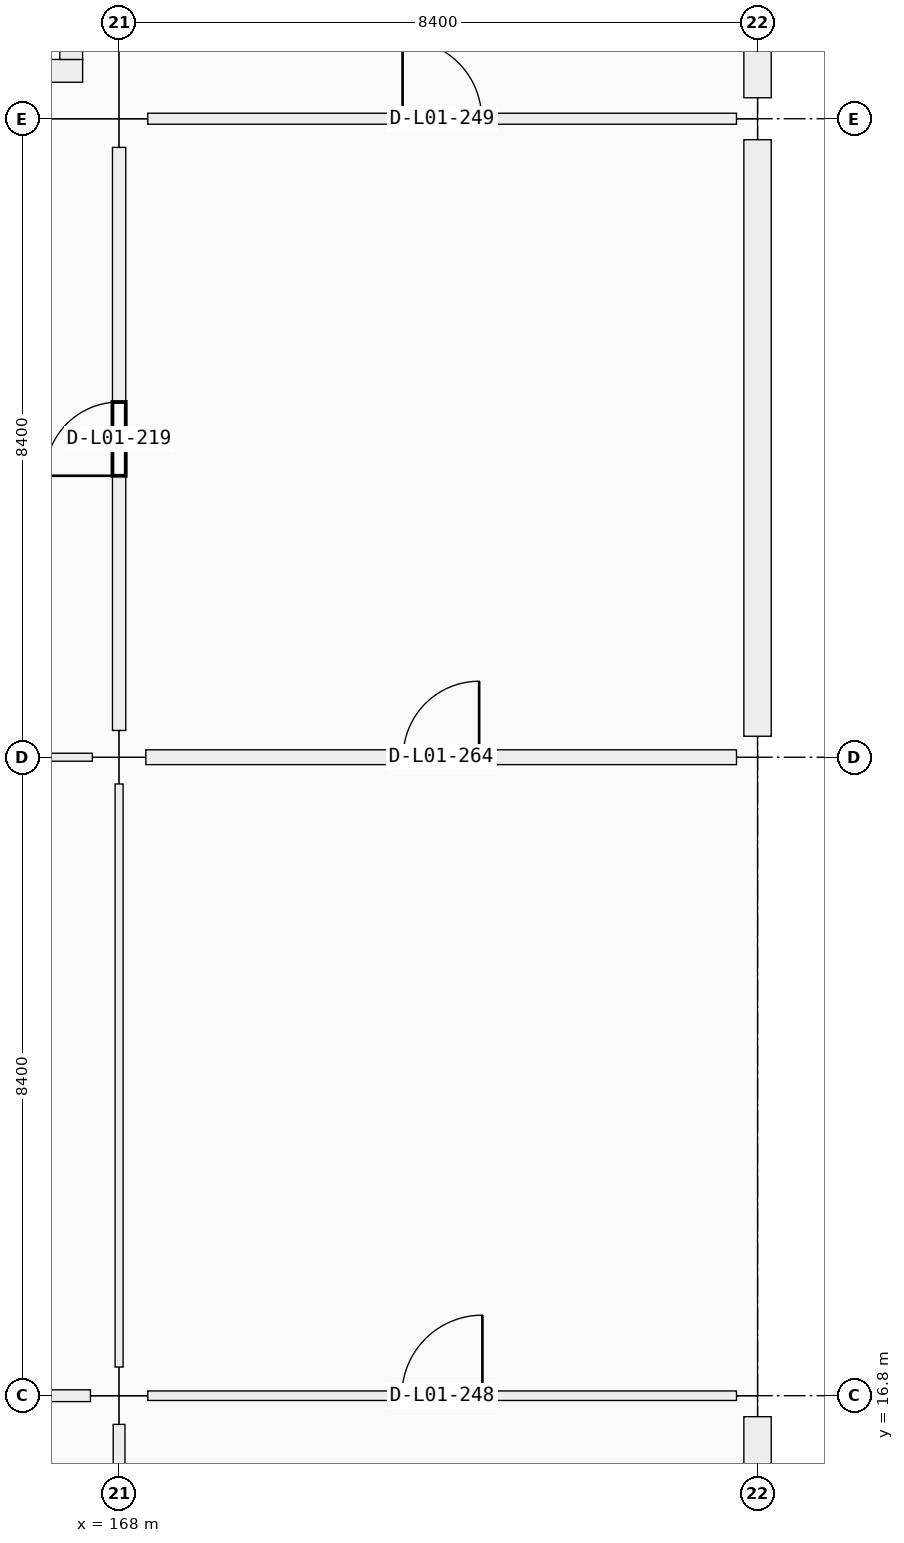
"""IFC4 building model, lengths in metres.
Left out: names, types, materials, properties, quantities, classifications, styles, units other than length and angle.
Written with IfcOpenShell. Run it as: python <this file> out.ifc"""

import sys

from ifc_helpers import new_model, si_unit, direction, frame, frame_2d, origin, origin_2d, place, context, subcontext, project, spatial, rectangle, extrude, element, fill, save


model = new_model("IFC4")
c1 = context("Model", 3, precision=1e-05, world=origin(), true_north=direction((0.0, 1.0)))
c2 = subcontext(c1, "Body", "Model", "MODEL_VIEW")
j1 = project(units=[si_unit("LENGTHUNIT", "METRE"), si_unit("PLANEANGLEUNIT", "RADIAN")], contexts=[c1])
p1 = place(None, origin())
s1 = spatial("IfcSite", under=j1, at=p1, CompositionType="ELEMENT")
p2 = place(p1, origin())
s2 = spatial("IfcBuilding", under=s1, at=p2, CompositionType="ELEMENT")
p3 = place(p2, frame((0.0, 0.0, 5.76)))
s3 = spatial("IfcBuildingStorey", under=s2, at=p3, CompositionType="ELEMENT", Elevation=5.76)
p4 = place(p3, frame((168.0, 16.8, 0.0), z_axis=(0.0, 0.0, 1.0), x_axis=(1.0, 0.0, 0.0)))
e1 = element("IfcColumn", 1, at=p4, inside=s3, PredefinedType="COLUMN", context=c2, shape_type="SweptSolid", body=[
    extrude(rectangle(XDim=0.75, YDim=0.75, at=origin_2d()), origin(), (0.0, 0.0, 1.0), 4.5),
])
p5 = place(p3, frame((168.0, 25.2, 0.0), z_axis=(0.0, 0.0, 1.0), x_axis=(1.0, 0.0, 0.0)))
e2 = element("IfcColumn", 2, at=p5, inside=s3, PredefinedType="COLUMN", context=c2, shape_type="SweptSolid", body=[
    extrude(rectangle(XDim=0.7, YDim=0.7, at=origin_2d()), origin(), (0.0, 0.0, 1.0), 4.5),
])
p6 = place(p3, frame((168.0, 33.6, 0.0), z_axis=(0.0, 0.0, 1.0), x_axis=(1.0, 0.0, 0.0)))
e3 = element("IfcColumn", 3, at=p6, inside=s3, PredefinedType="COLUMN", context=c2, shape_type="SweptSolid", body=[
    extrude(rectangle(XDim=0.75, YDim=0.75, at=origin_2d()), origin(), (0.0, 0.0, 1.0), 4.5),
])
for number, where, z_axis, x_axis in (
    (4, (176.4, 16.8, 0.0), (0.0, 0.0, 1.0), (1.0, 0.0, 0.0)),
    (5, (176.4, 25.2, 0.0), (0.0, 0.0, 1.0), (1.0, 0.0, 0.0)),
    (6, (176.4, 33.6, 0.0), (0.0, 0.0, 1.0), (1.0, 0.0, 0.0)),
):
    element("IfcColumn", number, at=place(p3, frame(where, z_axis=z_axis, x_axis=x_axis)), inside=s3, PredefinedType="COLUMN", context=c2, shape_type="SweptSolid", body=[
        extrude(rectangle(XDim=0.55, YDim=0.55, at=origin_2d()), origin(), (0.0, 0.0, 1.0), 4.2),
    ])
p7 = place(p3, frame((176.4, 16.524, 0.0), z_axis=(0.0, 0.0, 1.0), x_axis=(0.0, -1.0, 0.0)))
e7 = element("IfcWall", 7, at=p7, inside=s3, PredefinedType="SOLIDWALL", context=c2, shape_type="SweptSolid", body=[
    extrude(rectangle(XDim=7.848, YDim=0.36, at=frame_2d((3.924, 0.0))), origin(), (0.0, 0.0, 1.0), 3.4),
])
p8 = place(p7, frame((2.649, 0.0, 0.9)))
e8 = element("IfcOpeningElement", 8, at=p8, cuts=e7, PredefinedType="OPENING", context=c2, shape_type="SweptSolid", body=[
    extrude(rectangle(XDim=2.55, YDim=1.95, at=frame_2d((1.275, 0.975))), frame((0.0, 0.18, 0.0), z_axis=(0.0, -1.0, 0.0), x_axis=(1.0, 0.0, 0.0)), (0.0, 0.0, 1.0), 0.36),
])
p9 = place(p3, frame((176.4, 33.324, 0.0), z_axis=(0.0, 0.0, 1.0), x_axis=(0.0, -1.0, 0.0)))
e9 = element("IfcWall", 9, at=p9, inside=s3, PredefinedType="SOLIDWALL", context=c2, shape_type="SweptSolid", body=[
    extrude(rectangle(XDim=7.848, YDim=0.36, at=frame_2d((3.924, 0.0))), origin(), (0.0, 0.0, 1.0), 3.4),
])
p10 = place(p9, frame((3.274, 0.0, 0.9)))
e10 = element("IfcOpeningElement", 10, at=p10, cuts=e9, PredefinedType="OPENING", context=c2, shape_type="SweptSolid", body=[
    extrude(rectangle(XDim=1.3, YDim=1.95, at=frame_2d((0.65, 0.975))), frame((0.0, 0.18, 0.0), z_axis=(0.0, -1.0, 0.0), x_axis=(1.0, 0.0, 0.0)), (0.0, 0.0, 1.0), 0.36),
])
p11 = place(p3, frame((176.4, 41.724, 0.0), z_axis=(0.0, 0.0, 1.0), x_axis=(0.0, -1.0, 0.0)))
e11 = element("IfcWall", 11, at=p11, inside=s3, PredefinedType="SOLIDWALL", context=c2, shape_type="SweptSolid", body=[
    extrude(rectangle(XDim=7.848, YDim=0.36, at=frame_2d((3.924, 0.0))), origin(), (0.0, 0.0, 1.0), 3.4),
])
p12 = place(p11, frame((2.949, 0.0, 0.9)))
e12 = element("IfcOpeningElement", 12, at=p12, cuts=e11, PredefinedType="OPENING", context=c2, shape_type="SweptSolid", body=[
    extrude(rectangle(XDim=1.95, YDim=1.6, at=frame_2d((0.975, 0.8))), frame((0.0, 0.18, 0.0), z_axis=(0.0, -1.0, 0.0), x_axis=(1.0, 0.0, 0.0)), (0.0, 0.0, 1.0), 0.36),
])
p13 = place(p3, frame((167.52, 34.23, 0.0), z_axis=(0.0, 0.0, 1.0), x_axis=(-1.0, 0.0, 0.0)))
e13 = element("IfcWall", 13, at=p13, inside=s3, PredefinedType="SHEAR", context=c2, shape_type="SweptSolid", body=[
    extrude(rectangle(XDim=7.44, YDim=0.3, at=frame_2d((3.72, 0.0))), origin(), (0.0, 0.0, 1.0), 4.5),
])
p14 = place(p13, frame((1.28, 0.0, 0.0)))
e14 = element("IfcOpeningElement", 14, at=p14, cuts=e13, PredefinedType="OPENING", context=c2, shape_type="SweptSolid", body=[
    extrude(rectangle(XDim=1.5, YDim=2.15, at=frame_2d((0.75, 1.075))), frame((0.0, 0.15, 0.0), z_axis=(0.0, -1.0, 0.0), x_axis=(1.0, 0.0, 0.0)), (0.0, 0.0, 1.0), 0.3),
])
p15 = place(p3, frame((167.37, 41.22, 0.0), z_axis=(0.0, 0.0, 1.0), x_axis=(0.0, -1.0, 0.0)))
e15 = element("IfcWall", 15, at=p15, inside=s3, PredefinedType="SHEAR", context=c2, shape_type="SweptSolid", body=[
    extrude(rectangle(XDim=6.84, YDim=0.3, at=frame_2d((3.42, 0.0))), origin(), (0.0, 0.0, 1.0), 4.5),
])
p16 = place(p3, frame((159.952, 16.8, 0.0), z_axis=(0.0, 0.0, 1.0), x_axis=(1.0, 0.0, 0.0)))
e16 = element("IfcWall", 16, at=p16, inside=s3, PredefinedType="PARTITIONING", context=c2, shape_type="SweptSolid", body=[
    extrude(rectangle(XDim=7.671, YDim=0.155, at=frame_2d((3.835, 0.0))), origin(), (0.0, 0.0, 1.0), 2.4),
])
p17 = place(p16, frame((3.325, 0.0, 0.0)))
e17 = element("IfcOpeningElement", 17, at=p17, cuts=e16, PredefinedType="OPENING", context=c2, shape_type="SweptSolid", body=[
    extrude(rectangle(XDim=1.02, YDim=2.2, at=frame_2d((0.51, 1.1))), frame((0.0, 0.078, 0.0), z_axis=(0.0, -1.0, 0.0), x_axis=(1.0, 0.0, 0.0)), (0.0, 0.0, 1.0), 0.155),
])
p18 = place(p3, frame((159.977, 25.2, 0.0), z_axis=(0.0, 0.0, 1.0), x_axis=(1.0, 0.0, 0.0)))
e18 = element("IfcWall", 18, at=p18, inside=s3, PredefinedType="PARTITIONING", context=c2, shape_type="SweptSolid", body=[
    extrude(rectangle(XDim=7.671, YDim=0.105, at=frame_2d((3.835, 0.0))), origin(), (0.0, 0.0, 1.0), 2.4),
])
p19 = place(p18, frame((3.331, 0.0, 0.0)))
e19 = element("IfcOpeningElement", 19, at=p19, cuts=e18, PredefinedType="OPENING", context=c2, shape_type="SweptSolid", body=[
    extrude(rectangle(XDim=1.01, YDim=2.12, at=frame_2d((0.505, 1.06))), frame((0.0, 0.052, 0.0), z_axis=(0.0, -1.0, 0.0), x_axis=(1.0, 0.0, 0.0)), (0.0, 0.0, 1.0), 0.105),
])
p20 = place(p3, frame((168.377, 16.8, 0.0), z_axis=(0.0, 0.0, 1.0), x_axis=(1.0, 0.0, 0.0)))
e20 = element("IfcWall", 20, at=p20, inside=s3, PredefinedType="PARTITIONING", context=c2, shape_type="SweptSolid", body=[
    extrude(rectangle(XDim=7.746, YDim=0.125, at=frame_2d((3.873, 0.0))), origin(), (0.0, 0.0, 1.0), 2.4),
])
p21 = place(p20, frame((3.343, 0.0, 0.0)))
e21 = element("IfcOpeningElement", 21, at=p21, cuts=e20, PredefinedType="OPENING", context=c2, shape_type="SweptSolid", body=[
    extrude(rectangle(XDim=1.06, YDim=2.22, at=frame_2d((0.53, 1.11))), frame((0.0, 0.062, 0.0), z_axis=(0.0, -1.0, 0.0), x_axis=(1.0, 0.0, 0.0)), (0.0, 0.0, 1.0), 0.125),
])
p22 = place(p3, frame((168.352, 25.2, 0.0), z_axis=(0.0, 0.0, 1.0), x_axis=(1.0, 0.0, 0.0)))
e22 = element("IfcWall", 22, at=p22, inside=s3, PredefinedType="PARTITIONING", context=c2, shape_type="SweptSolid", body=[
    extrude(rectangle(XDim=7.771, YDim=0.195, at=frame_2d((3.885, 0.0))), origin(), (0.0, 0.0, 1.0), 2.4),
])
p23 = place(p22, frame((3.385, 0.0, 0.0)))
e23 = element("IfcOpeningElement", 23, at=p23, cuts=e22, PredefinedType="OPENING", context=c2, shape_type="SweptSolid", body=[
    extrude(rectangle(XDim=1.0, YDim=2.2, at=frame_2d((0.5, 1.1))), frame((0.0, 0.098, 0.0), z_axis=(0.0, -1.0, 0.0), x_axis=(1.0, 0.0, 0.0)), (0.0, 0.0, 1.0), 0.195),
])
p24 = place(p3, frame((168.377, 33.6, 0.0), z_axis=(0.0, 0.0, 1.0), x_axis=(1.0, 0.0, 0.0)))
e24 = element("IfcWall", 24, at=p24, inside=s3, PredefinedType="PARTITIONING", context=c2, shape_type="SweptSolid", body=[
    extrude(rectangle(XDim=7.746, YDim=0.145, at=frame_2d((3.873, 0.0))), origin(), (0.0, 0.0, 1.0), 2.4),
])
p25 = place(p24, frame((3.353, 0.0, 0.0)))
e25 = element("IfcOpeningElement", 25, at=p25, cuts=e24, PredefinedType="OPENING", context=c2, shape_type="SweptSolid", body=[
    extrude(rectangle(XDim=1.04, YDim=2.2, at=frame_2d((0.52, 1.1))), frame((0.0, 0.073, 0.0), z_axis=(0.0, -1.0, 0.0), x_axis=(1.0, 0.0, 0.0)), (0.0, 0.0, 1.0), 0.145),
])
p26 = place(p3, frame((168.0, 8.702, 0.0), z_axis=(0.0, 0.0, 1.0), x_axis=(0.0, 1.0, 0.0)))
e26 = element("IfcWall", 26, at=p26, inside=s3, PredefinedType="PARTITIONING", context=c2, shape_type="SweptSolid", body=[
    extrude(rectangle(XDim=7.721, YDim=0.155, at=frame_2d((3.861, 0.0))), origin(), (0.0, 0.0, 1.0), 2.4),
])
p27 = place(p26, frame((3.37, 0.0, 0.0)))
e27 = element("IfcOpeningElement", 27, at=p27, cuts=e26, PredefinedType="OPENING", context=c2, shape_type="SweptSolid", body=[
    extrude(rectangle(XDim=0.98, YDim=2.18, at=frame_2d((0.49, 1.09))), frame((0.0, 0.078, 0.0), z_axis=(0.0, -1.0, 0.0), x_axis=(1.0, 0.0, 0.0)), (0.0, 0.0, 1.0), 0.155),
])
p28 = place(p3, frame((168.0, 17.177, 0.0), z_axis=(0.0, 0.0, 1.0), x_axis=(0.0, 1.0, 0.0)))
e28 = element("IfcWall", 28, at=p28, inside=s3, PredefinedType="PARTITIONING", context=c2, shape_type="SweptSolid", body=[
    extrude(rectangle(XDim=7.671, YDim=0.105, at=frame_2d((3.835, 0.0))), origin(), (0.0, 0.0, 1.0), 2.4),
])
p29 = place(p28, frame((3.356, 0.0, 0.0)))
e29 = element("IfcOpeningElement", 29, at=p29, cuts=e28, PredefinedType="OPENING", context=c2, shape_type="SweptSolid", body=[
    extrude(rectangle(XDim=0.96, YDim=2.18, at=frame_2d((0.48, 1.09))), frame((0.0, 0.052, 0.0), z_axis=(0.0, -1.0, 0.0), x_axis=(1.0, 0.0, 0.0)), (0.0, 0.0, 1.0), 0.105),
])
p30 = place(p3, frame((168.0, 25.552, 0.0), z_axis=(0.0, 0.0, 1.0), x_axis=(0.0, 1.0, 0.0)))
e30 = element("IfcWall", 30, at=p30, inside=s3, PredefinedType="PARTITIONING", context=c2, shape_type="SweptSolid", body=[
    extrude(rectangle(XDim=7.671, YDim=0.175, at=frame_2d((3.835, 0.0))), origin(), (0.0, 0.0, 1.0), 2.4),
])
p31 = place(p30, frame((3.351, 0.0, 0.0)))
e31 = element("IfcOpeningElement", 31, at=p31, cuts=e30, PredefinedType="OPENING", context=c2, shape_type="SweptSolid", body=[
    extrude(rectangle(XDim=0.97, YDim=2.12, at=frame_2d((0.485, 1.06))), frame((0.0, 0.087, 0.0), z_axis=(0.0, -1.0, 0.0), x_axis=(1.0, 0.0, 0.0)), (0.0, 0.0, 1.0), 0.175),
])
p32 = place(p10, origin())
e32 = element("IfcWindow", 32, at=p32, inside=s3, PartitioningType="SINGLE_PANEL", PredefinedType="WINDOW", context=c2, shape_type="SweptSolid", body=[
    extrude(rectangle(XDim=1.3, YDim=1.95, at=frame_2d((0.65, 0.975))), frame((0.0, 0.03, 0.0), z_axis=(0.0, -1.0, 0.0), x_axis=(1.0, 0.0, 0.0)), (0.0, 0.0, 1.0), 0.06),
])
fill(e10, e32)
p33 = place(p31, origin())
e33 = element("IfcDoor", 33, at=p33, inside=s3, OperationType="SINGLE_SWING_LEFT", PredefinedType="DOOR", context=c2, shape_type="SweptSolid", body=[
    extrude(rectangle(XDim=0.97, YDim=2.12, at=frame_2d((0.485, 1.06))), frame((0.0, 0.025, 0.0), z_axis=(0.0, -1.0, 0.0), x_axis=(1.0, 0.0, 0.0)), (0.0, 0.0, 1.0), 0.05),
])
fill(e31, e33)
p34 = place(p21, origin())
e34 = element("IfcDoor", 34, at=p34, inside=s3, OperationType="SINGLE_SWING_RIGHT", PredefinedType="DOOR", context=c2, shape_type="SweptSolid", body=[
    extrude(rectangle(XDim=1.06, YDim=2.22, at=frame_2d((0.53, 1.11))), frame((0.0, 0.025, 0.0), z_axis=(0.0, -1.0, 0.0), x_axis=(1.0, 0.0, 0.0)), (0.0, 0.0, 1.0), 0.05),
])
fill(e21, e34)
p35 = place(p25, origin())
e35 = element("IfcDoor", 35, at=p35, inside=s3, OperationType="SINGLE_SWING_LEFT", PredefinedType="DOOR", context=c2, shape_type="SweptSolid", body=[
    extrude(rectangle(XDim=1.04, YDim=2.2, at=frame_2d((0.52, 1.1))), frame((0.0, 0.025, 0.0), z_axis=(0.0, -1.0, 0.0), x_axis=(1.0, 0.0, 0.0)), (0.0, 0.0, 1.0), 0.05),
])
fill(e25, e35)
p36 = place(p23, origin())
e36 = element("IfcDoor", 36, at=p36, inside=s3, OperationType="SINGLE_SWING_RIGHT", PredefinedType="DOOR", context=c2, shape_type="SweptSolid", body=[
    extrude(rectangle(XDim=1.0, YDim=2.2, at=frame_2d((0.5, 1.1))), frame((0.0, 0.025, 0.0), z_axis=(0.0, -1.0, 0.0), x_axis=(1.0, 0.0, 0.0)), (0.0, 0.0, 1.0), 0.05),
])
fill(e23, e36)
p37 = place(p29, origin())
e37 = element("IfcDoor", 37, at=p37, inside=s3, OperationType="SINGLE_SWING_LEFT", PredefinedType="DOOR", context=c2, shape_type="SweptSolid", body=[
    extrude(rectangle(XDim=0.96, YDim=2.18, at=frame_2d((0.48, 1.09))), frame((0.0, 0.025, 0.0), z_axis=(0.0, -1.0, 0.0), x_axis=(1.0, 0.0, 0.0)), (0.0, 0.0, 1.0), 0.05),
])
fill(e29, e37)
save(model, sys.argv[1])
